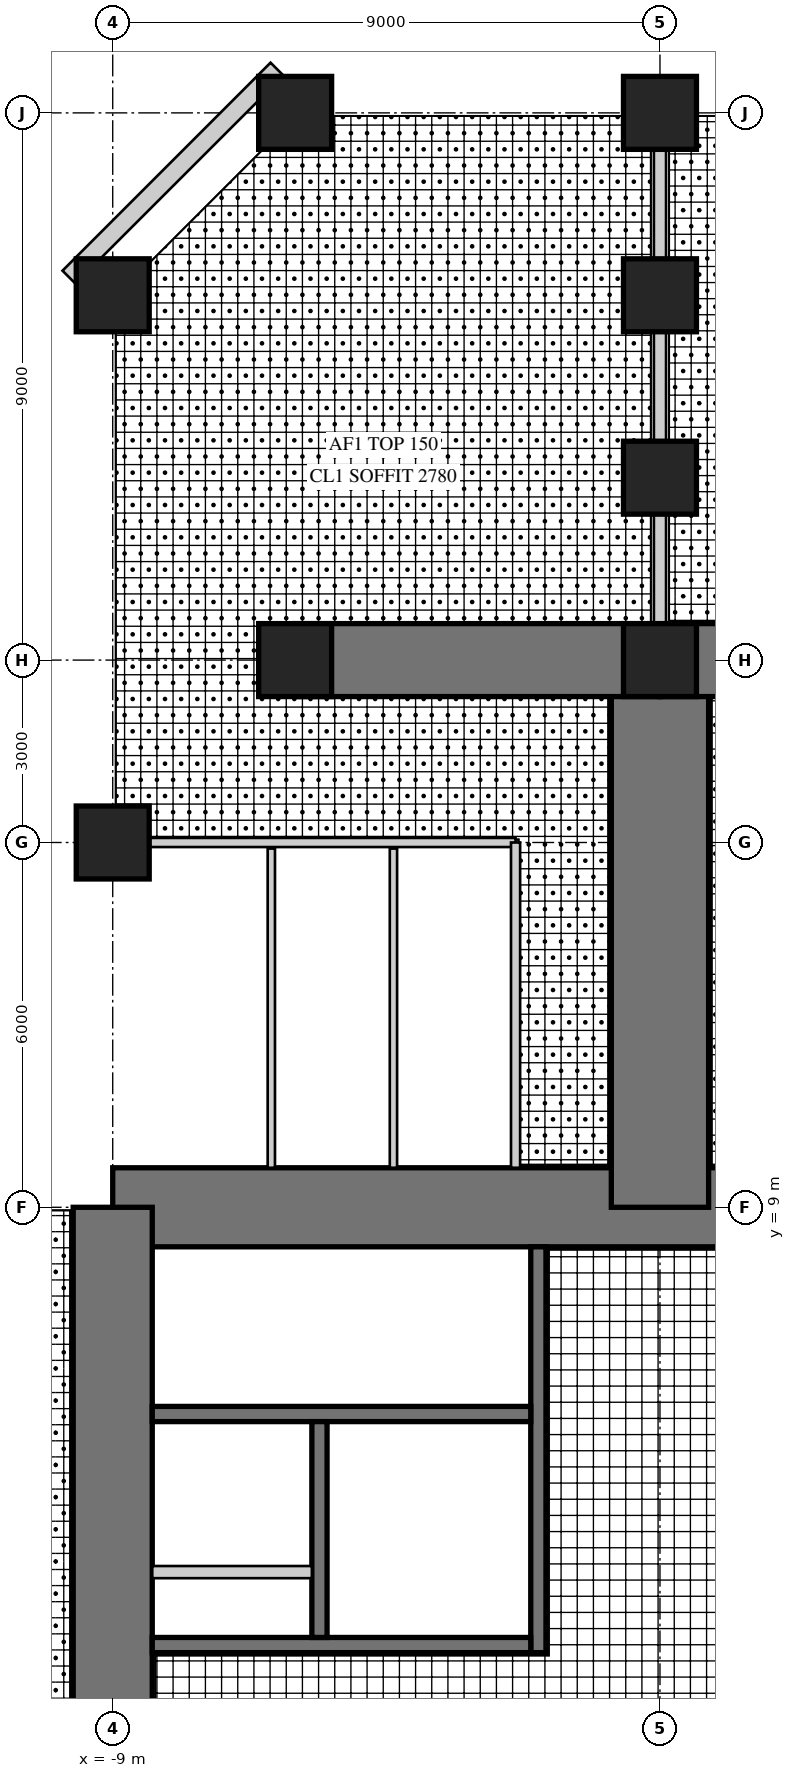
"""IFC4 building model, lengths in metres.
Left out: names, types, materials, properties, quantities, classifications, styles, units other than length and angle.
Written with IfcOpenShell. Run it as: python <this file> out.ifc"""

import sys

from ifc_helpers import new_model, si_unit, direction, frame, frame_2d, origin, origin_2d, place, context, subcontext, project, spatial, rectangle, hollow_rectangle, extrude, element, fill, save


model = new_model("IFC4")
c1 = context("Model", 3, precision=1e-05, world=origin(), true_north=direction((0.0, 1.0)))
c2 = subcontext(c1, "Body", "Model", "MODEL_VIEW")
j1 = project(units=[si_unit("LENGTHUNIT", "METRE"), si_unit("PLANEANGLEUNIT", "RADIAN")], contexts=[c1])
p1 = place(None, origin())
s1 = spatial("IfcSite", under=j1, at=p1, CompositionType="ELEMENT")
p2 = place(p1, origin())
s2 = spatial("IfcBuilding", under=s1, at=p2, CompositionType="ELEMENT")
p3 = place(p2, frame((0.0, 0.0, 35.5)))
s3 = spatial("IfcBuildingStorey", under=s2, at=p3, CompositionType="ELEMENT", Elevation=35.5)
p4 = place(p3, frame((9.0, 9.0, 0.0), z_axis=(0.0, 0.0, 1.0), x_axis=(-1.0, 0.0, 0.0)))
e1 = element("IfcWall", 1, at=p4, inside=s3, PredefinedType="SHEAR", context=c2, shape_type="SweptSolid", body=[
    extrude(rectangle(XDim=18.0, YDim=1.3, at=frame_2d((9.0, 0.0))), origin(), (0.0, 0.0, 1.0), 4.0),
])
p5 = place(p4, frame((9.8, 0.0, 0.0)))
e2 = element("IfcOpeningElement", 2, at=p5, cuts=e1, PredefinedType="OPENING", context=c2, shape_type="SweptSolid", body=[
    extrude(rectangle(XDim=1.0, YDim=2.4, at=frame_2d((0.5, 1.2))), frame((0.0, 0.66, 0.0), z_axis=(0.0, -1.0, 0.0), x_axis=(1.0, 0.0, 0.0)), (0.0, 0.0, 1.0), 1.32),
])
p6 = place(p3, frame((-9.0, 9.0, 0.0), z_axis=(0.0, 0.0, 1.0), x_axis=(0.0, -1.0, 0.0)))
e3 = element("IfcWall", 3, at=p6, inside=s3, PredefinedType="SHEAR", context=c2, shape_type="SweptSolid", body=[
    extrude(rectangle(XDim=18.0, YDim=1.3, at=frame_2d((9.0, 0.0))), origin(), (0.0, 0.0, 1.0), 4.0),
])
p7 = place(p6, frame((9.8, 0.0, 0.0)))
e4 = element("IfcOpeningElement", 4, at=p7, cuts=e3, PredefinedType="OPENING", context=c2, shape_type="SweptSolid", body=[
    extrude(rectangle(XDim=1.0, YDim=2.4, at=frame_2d((0.5, 1.2))), frame((0.0, 0.66, 0.0), z_axis=(0.0, -1.0, 0.0), x_axis=(1.0, 0.0, 0.0)), (0.0, 0.0, 1.0), 1.32),
])
p8 = place(p3, frame((-2.0, 1.675, 0.0), z_axis=(0.0, 0.0, 1.0), x_axis=(0.0, 1.0, 0.0)))
e5 = element("IfcWall", 5, at=p8, inside=s3, PredefinedType="SHEAR", context=c2, shape_type="SweptSolid", body=[
    extrude(rectangle(XDim=6.675, YDim=0.25, at=frame_2d((3.337, 0.0))), origin(), (0.0, 0.0, 1.0), 4.0),
])
p9 = place(p8, frame((0.725, 0.0, 0.0)))
e6 = element("IfcOpeningElement", 6, at=p9, cuts=e5, PredefinedType="OPENING", context=c2, shape_type="SweptSolid", body=[
    extrude(rectangle(XDim=1.0, YDim=2.1, at=frame_2d((0.5, 1.05))), frame((0.0, 0.135, 0.0), z_axis=(0.0, -1.0, 0.0), x_axis=(1.0, 0.0, 0.0)), (0.0, 0.0, 1.0), 0.27),
])
p10 = place(p3, frame((-2.125, 1.8, 0.0), z_axis=(0.0, 0.0, 1.0), x_axis=(-1.0, 0.0, 0.0)))
e7 = element("IfcWall", 7, at=p10, inside=s3, PredefinedType="SHEAR", context=c2, shape_type="SweptSolid", body=[
    extrude(rectangle(XDim=6.225, YDim=0.25, at=frame_2d((3.113, 0.0))), origin(), (0.0, 0.0, 1.0), 4.0),
])
p11 = place(p3, frame((-2.125, 5.6, 0.0), z_axis=(0.0, 0.0, 1.0), x_axis=(-1.0, 0.0, 0.0)))
e8 = element("IfcWall", 8, at=p11, inside=s3, PredefinedType="SHEAR", context=c2, shape_type="SweptSolid", body=[
    extrude(rectangle(XDim=6.225, YDim=0.25, at=frame_2d((3.113, 0.0))), origin(), (0.0, 0.0, 1.0), 4.0),
])
p12 = place(p11, frame((0.175, 0.0, 0.0)))
e9 = element("IfcOpeningElement", 9, at=p12, cuts=e8, PredefinedType="OPENING", context=c2, shape_type="SweptSolid", body=[
    extrude(rectangle(XDim=1.0, YDim=2.1, at=frame_2d((0.5, 1.05))), frame((0.0, 0.135, 0.0), z_axis=(0.0, -1.0, 0.0), x_axis=(1.0, 0.0, 0.0)), (0.0, 0.0, 1.0), 0.27),
])
p13 = place(p3, frame((-5.6, 1.925, 0.0), z_axis=(0.0, 0.0, 1.0), x_axis=(0.0, 1.0, 0.0)))
e10 = element("IfcWall", 10, at=p13, inside=s3, PredefinedType="SHEAR", context=c2, shape_type="SweptSolid", body=[
    extrude(rectangle(XDim=3.55, YDim=0.25, at=frame_2d((1.775, 0.0))), origin(), (0.0, 0.0, 1.0), 4.0),
])
p14 = place(p13, frame((1.525, 0.0, 0.0)))
e11 = element("IfcOpeningElement", 11, at=p14, cuts=e10, PredefinedType="OPENING", context=c2, shape_type="SweptSolid", body=[
    extrude(rectangle(XDim=1.1, YDim=2.2, at=frame_2d((0.55, 1.1))), frame((0.0, 0.135, 0.0), z_axis=(0.0, -1.0, 0.0), x_axis=(1.0, 0.0, 0.0)), (0.0, 0.0, 1.0), 0.27),
])
p15 = place(p13, frame((0.075, 0.0, 0.0)))
e12 = element("IfcOpeningElement", 12, at=p15, cuts=e10, PredefinedType="OPENING", context=c2, shape_type="SweptSolid", body=[
    extrude(rectangle(XDim=0.8, YDim=2.1, at=frame_2d((0.4, 1.05))), frame((0.0, 0.135, 0.0), z_axis=(0.0, -1.0, 0.0), x_axis=(1.0, 0.0, 0.0)), (0.0, 0.0, 1.0), 0.27),
])
p16 = place(p3, frame((-5.725, 3.0, 0.0), z_axis=(0.0, 0.0, 1.0), x_axis=(-1.0, 0.0, 0.0)))
e13 = element("IfcWall", 13, at=p16, inside=s3, PredefinedType="PARTITIONING", context=c2, shape_type="SweptSolid", body=[
    extrude(rectangle(XDim=2.625, YDim=0.2, at=frame_2d((1.312, 0.0))), origin(), (0.0, 0.0, 1.0), 4.0),
])
p17 = place(p3, frame((0.0, 9.0, 0.0), z_axis=(0.0, 0.0, 1.0), x_axis=(0.0, 1.0, 0.0)))
e14 = element("IfcWall", 14, at=p17, inside=s3, PredefinedType="SHEAR", context=c2, shape_type="SweptSolid", body=[
    extrude(rectangle(XDim=9.0, YDim=1.6, at=frame_2d((4.5, 0.0))), origin(), (0.0, 0.0, 1.0), 4.0),
])
for number, where, z_axis, x_axis in (
    (15, (0.0, 18.0, 0.0), (0.0, 0.0, 1.0), (-1.0, 0.0, 0.0)),
    (16, (0.0, 18.0, 0.0), (0.0, 0.0, 1.0), (1.0, 0.0, 0.0)),
):
    element("IfcWall", number, at=place(p3, frame(where, z_axis=z_axis, x_axis=x_axis)), inside=s3, PredefinedType="SHEAR", context=c2, shape_type="SweptSolid", body=[
        extrude(rectangle(XDim=6.0, YDim=1.2, at=frame_2d((3.0, 0.0))), origin(), (0.0, 0.0, 1.0), 4.0),
    ])
for number, where, z_axis, x_axis in (
    (17, (-9.0, 15.0, 0.0), (0.0, 0.0, 1.0), (1.0, 0.0, 0.0)),
    (18, (-9.0, 24.0, 0.0), (0.0, 0.0, 1.0), (1.0, 0.0, 0.0)),
    (19, (0.0, 27.0, 0.0), (0.0, 0.0, 1.0), (1.0, 0.0, 0.0)),
    (20, (-6.0, 27.0, 0.0), (0.0, 0.0, 1.0), (1.0, 0.0, 0.0)),
    (21, (0.0, 18.0, 0.0), (0.0, 0.0, 1.0), (1.0, 0.0, 0.0)),
    (22, (-6.0, 18.0, 0.0), (0.0, 0.0, 1.0), (1.0, 0.0, 0.0)),
    (23, (0.0, 21.0, 0.0), (0.0, 0.0, 1.0), (1.0, 0.0, 0.0)),
    (24, (0.0, 24.0, 0.0), (0.0, 0.0, 1.0), (1.0, 0.0, 0.0)),
):
    element("IfcColumn", number, at=place(p3, frame(where, z_axis=z_axis, x_axis=x_axis)), inside=s3, PredefinedType="COLUMN", context=c2, shape_type="SweptSolid", body=[
        extrude(rectangle(XDim=1.2, YDim=1.2, at=origin_2d()), origin(), (0.0, 0.0, 1.0), 4.0),
    ])
p18 = place(p3, frame((-6.298, 27.72, 0.0), z_axis=(0.0, 0.0, 1.0), x_axis=(-0.707106781187, -0.707106781187, 0.0)))
e25 = element("IfcWall", 25, at=p18, inside=s3, PredefinedType="SOLIDWALL", context=c2, shape_type="SweptSolid", body=[
    extrude(rectangle(XDim=4.839, YDim=0.3, at=frame_2d((2.419, 0.0))), origin(), (0.0, 0.0, 1.0), 3.8),
])
p19 = place(p18, frame((1.969, 0.0, 0.3)))
e26 = element("IfcOpeningElement", 26, at=p19, cuts=e25, PredefinedType="OPENING", context=c2, shape_type="SweptSolid", body=[
    extrude(rectangle(XDim=0.9, YDim=2.4, at=frame_2d((0.45, 1.2))), frame((0.0, 0.16, 0.0), z_axis=(0.0, -1.0, 0.0), x_axis=(1.0, 0.0, 0.0)), (0.0, 0.0, 1.0), 0.32),
])
p20 = place(p3, frame((-2.375, 15.0, 0.0), z_axis=(0.0, 0.0, 1.0), x_axis=(-1.0, 0.0, 0.0)))
e27 = element("IfcWall", 27, at=p20, inside=s3, PredefinedType="PARTITIONING", context=c2, shape_type="SweptSolid", body=[
    extrude(rectangle(XDim=6.025, YDim=0.15, at=frame_2d((3.012, 0.0))), origin(), (0.0, 0.0, 1.0), 2.95),
])
p21 = place(p20, frame((0.504, 0.0, 0.0)))
e28 = element("IfcOpeningElement", 28, at=p21, cuts=e27, PredefinedType="OPENING", context=c2, shape_type="SweptSolid", body=[
    extrude(rectangle(XDim=1.0, YDim=2.1, at=frame_2d((0.5, 1.05))), frame((0.0, 0.085, 0.0), z_axis=(0.0, -1.0, 0.0), x_axis=(1.0, 0.0, 0.0)), (0.0, 0.0, 1.0), 0.17),
])
p22 = place(p20, frame((2.512, 0.0, 0.0)))
e29 = element("IfcOpeningElement", 29, at=p22, cuts=e27, PredefinedType="OPENING", context=c2, shape_type="SweptSolid", body=[
    extrude(rectangle(XDim=1.0, YDim=2.1, at=frame_2d((0.5, 1.05))), frame((0.0, 0.085, 0.0), z_axis=(0.0, -1.0, 0.0), x_axis=(1.0, 0.0, 0.0)), (0.0, 0.0, 1.0), 0.17),
])
p23 = place(p20, frame((4.521, 0.0, 0.0)))
e30 = element("IfcOpeningElement", 30, at=p23, cuts=e27, PredefinedType="OPENING", context=c2, shape_type="SweptSolid", body=[
    extrude(rectangle(XDim=1.0, YDim=2.1, at=frame_2d((0.5, 1.05))), frame((0.0, 0.085, 0.0), z_axis=(0.0, -1.0, 0.0), x_axis=(1.0, 0.0, 0.0)), (0.0, 0.0, 1.0), 0.17),
])
p24 = place(p3, frame((-2.375, 9.65, 0.0), z_axis=(0.0, 0.0, 1.0), x_axis=(0.0, 1.0, 0.0)))
e31 = element("IfcWall", 31, at=p24, inside=s3, PredefinedType="PARTITIONING", context=c2, shape_type="SweptSolid", body=[
    extrude(rectangle(XDim=5.35, YDim=0.15, at=frame_2d((2.675, 0.0))), origin(), (0.0, 0.0, 1.0), 3.8),
])
for number, where, z_axis, x_axis in (
    (32, (-4.383, 9.65, 0.0), (0.0, 0.0, 1.0), (0.0, 1.0, 0.0)),
    (33, (-6.392, 9.65, 0.0), (0.0, 0.0, 1.0), (0.0, 1.0, 0.0)),
):
    element("IfcWall", number, at=place(p3, frame(where, z_axis=z_axis, x_axis=x_axis)), inside=s3, PredefinedType="PLUMBINGWALL", context=c2, shape_type="SweptSolid", body=[
        extrude(rectangle(XDim=5.25, YDim=0.12, at=frame_2d((2.625, 0.0))), origin(), (0.0, 0.0, 1.0), 3.8),
    ])
p25 = place(p3, frame((0.0, 18.0, 0.0), z_axis=(0.0, 0.0, 1.0), x_axis=(0.0, 1.0, 0.0)))
e34 = element("IfcWall", 34, at=p25, inside=s3, PredefinedType="SOLIDWALL", context=c2, shape_type="SweptSolid", body=[
    extrude(rectangle(XDim=3.0, YDim=0.2, at=frame_2d((1.5, 0.0))), origin(), (0.0, 0.0, 1.0), 3.8),
])
p26 = place(p25, frame((0.9, 0.0, 0.0)))
e35 = element("IfcOpeningElement", 35, at=p26, cuts=e34, PredefinedType="OPENING", context=c2, shape_type="SweptSolid", body=[
    extrude(rectangle(XDim=1.0, YDim=2.2, at=frame_2d((0.5, 1.1))), frame((0.0, 0.11, 0.0), z_axis=(0.0, -1.0, 0.0), x_axis=(1.0, 0.0, 0.0)), (0.0, 0.0, 1.0), 0.22),
])
p27 = place(p3, frame((0.0, 21.0, 0.0), z_axis=(0.0, 0.0, 1.0), x_axis=(0.0, 1.0, 0.0)))
e36 = element("IfcWall", 36, at=p27, inside=s3, PredefinedType="SOLIDWALL", context=c2, shape_type="SweptSolid", body=[
    extrude(rectangle(XDim=6.0, YDim=0.2, at=frame_2d((3.0, 0.0))), origin(), (0.0, 0.0, 1.0), 2.9),
])
p28 = place(p19, origin())
e37 = element("IfcWindow", 37, at=p28, inside=s3, PartitioningType="SINGLE_PANEL", PredefinedType="WINDOW", context=c2, shape_type="SweptSolid", body=[
    extrude(hollow_rectangle(XDim=0.9, YDim=2.4, WallThickness=0.06, at=frame_2d((0.45, 1.2))), frame((0.0, 0.03, 0.0), z_axis=(0.0, -1.0, 0.0), x_axis=(1.0, 0.0, 0.0)), (0.0, 0.0, 1.0), 0.06),
    extrude(rectangle(XDim=0.779, YDim=2.279, at=frame_2d((0.45, 1.2))), frame((0.0, 0.03, 0.0), z_axis=(0.0, -1.0, 0.0), x_axis=(1.0, 0.0, 0.0)), (0.0, 0.0, 1.0), 0.06),
])
fill(e26, e37)
p29 = place(p21, origin())
e38 = element("IfcDoor", 38, at=p29, inside=s3, OperationType="SINGLE_SWING_LEFT", PredefinedType="DOOR", context=c2, shape_type="SweptSolid", body=[
    extrude(rectangle(XDim=1.0, YDim=2.1, at=frame_2d((0.5, 1.05))), frame((0.0, 0.025, 0.0), z_axis=(0.0, -1.0, 0.0), x_axis=(1.0, 0.0, 0.0)), (0.0, 0.0, 1.0), 0.05),
])
fill(e28, e38)
p30 = place(p22, origin())
e39 = element("IfcDoor", 39, at=p30, inside=s3, OperationType="SINGLE_SWING_LEFT", PredefinedType="DOOR", context=c2, shape_type="SweptSolid", body=[
    extrude(rectangle(XDim=1.0, YDim=2.1, at=frame_2d((0.5, 1.05))), frame((0.0, 0.025, 0.0), z_axis=(0.0, -1.0, 0.0), x_axis=(1.0, 0.0, 0.0)), (0.0, 0.0, 1.0), 0.05),
])
fill(e29, e39)
p31 = place(p23, origin())
e40 = element("IfcDoor", 40, at=p31, inside=s3, OperationType="SINGLE_SWING_LEFT", PredefinedType="DOOR", context=c2, shape_type="SweptSolid", body=[
    extrude(rectangle(XDim=1.0, YDim=2.1, at=frame_2d((0.5, 1.05))), frame((0.0, 0.025, 0.0), z_axis=(0.0, -1.0, 0.0), x_axis=(1.0, 0.0, 0.0)), (0.0, 0.0, 1.0), 0.05),
])
fill(e30, e40)
p32 = place(p26, origin())
e41 = element("IfcDoor", 41, at=p32, inside=s3, OperationType="SINGLE_SWING_LEFT", PredefinedType="DOOR", context=c2, shape_type="SweptSolid", body=[
    extrude(rectangle(XDim=1.0, YDim=2.2, at=frame_2d((0.5, 1.1))), frame((0.0, 0.025, 0.0), z_axis=(0.0, -1.0, 0.0), x_axis=(1.0, 0.0, 0.0)), (0.0, 0.0, 1.0), 0.05),
])
fill(e35, e41)
p33 = place(p5, frame((1.0, 0.0, 0.0), z_axis=(0.0, 0.0, 1.0), x_axis=(-1.0, 0.0, 0.0)))
e42 = element("IfcDoor", 42, at=p33, inside=s3, OperationType="SINGLE_SWING_RIGHT", PredefinedType="DOOR", context=c2, shape_type="SweptSolid", body=[
    extrude(rectangle(XDim=1.0, YDim=2.4, at=frame_2d((0.5, 1.2))), frame((0.0, -0.005, 0.0), z_axis=(0.0, -1.0, 0.0), x_axis=(1.0, 0.0, 0.0)), (0.0, 0.0, 1.0), 0.05),
])
fill(e2, e42)
p34 = place(p9, origin())
e43 = element("IfcDoor", 43, at=p34, inside=s3, OperationType="SINGLE_SWING_LEFT", PredefinedType="DOOR", context=c2, shape_type="SweptSolid", body=[
    extrude(rectangle(XDim=1.0, YDim=2.1, at=frame_2d((0.5, 1.05))), frame((0.0, 0.025, 0.0), z_axis=(0.0, -1.0, 0.0), x_axis=(1.0, 0.0, 0.0)), (0.0, 0.0, 1.0), 0.05),
])
fill(e6, e43)
p35 = place(p12, frame((1.0, 0.0, 0.0), z_axis=(0.0, 0.0, 1.0), x_axis=(-1.0, 0.0, 0.0)))
e44 = element("IfcDoor", 44, at=p35, inside=s3, OperationType="SINGLE_SWING_RIGHT", PredefinedType="DOOR", context=c2, shape_type="SweptSolid", body=[
    extrude(rectangle(XDim=1.0, YDim=2.1, at=frame_2d((0.5, 1.05))), frame((0.0, 0.025, 0.0), z_axis=(0.0, -1.0, 0.0), x_axis=(1.0, 0.0, 0.0)), (0.0, 0.0, 1.0), 0.05),
])
fill(e9, e44)
p36 = place(p14, origin())
e45 = element("IfcDoor", 45, at=p36, inside=s3, OperationType="DOUBLE_DOOR_SLIDING", PredefinedType="DOOR", context=c2, shape_type="SweptSolid", body=[
    extrude(rectangle(XDim=1.1, YDim=2.2, at=frame_2d((0.55, 1.1))), frame((0.0, 0.025, 0.0), z_axis=(0.0, -1.0, 0.0), x_axis=(1.0, 0.0, 0.0)), (0.0, 0.0, 1.0), 0.05),
])
fill(e11, e45)
p37 = place(p15, origin())
e46 = element("IfcDoor", 46, at=p37, inside=s3, OperationType="SINGLE_SWING_LEFT", PredefinedType="DOOR", context=c2, shape_type="SweptSolid", body=[
    extrude(rectangle(XDim=0.8, YDim=2.1, at=frame_2d((0.4, 1.05))), frame((0.0, 0.025, 0.0), z_axis=(0.0, -1.0, 0.0), x_axis=(1.0, 0.0, 0.0)), (0.0, 0.0, 1.0), 0.05),
])
fill(e12, e46)
save(model, sys.argv[1])
